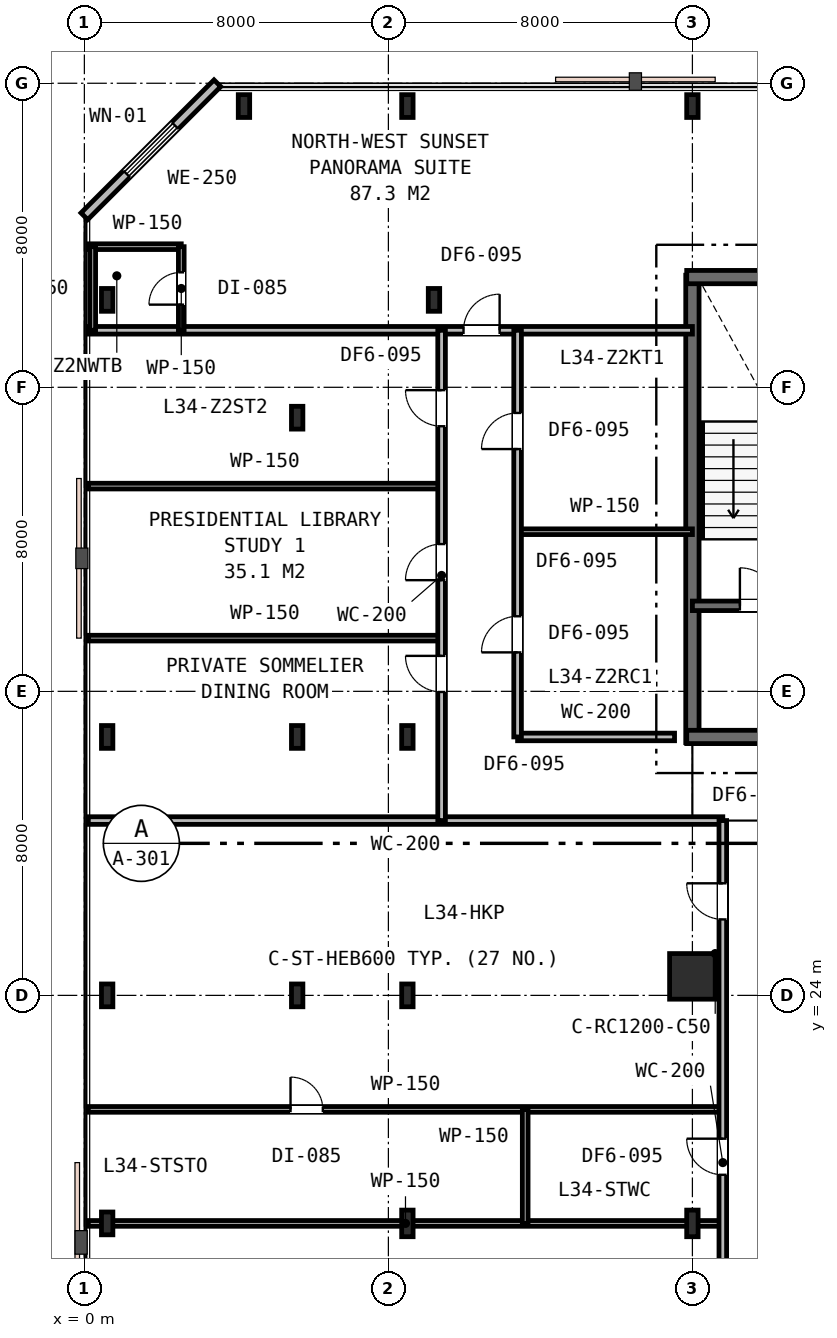
"""IFC4 building model, lengths in metres.
Left out: names, types, materials, properties, quantities, classifications, styles, units other than length and angle.
Written with IfcOpenShell. Run it as: python <this file> out.ifc"""

import sys

from ifc_helpers import new_model, si_unit, direction, frame, frame_2d, origin, origin_2d, place, context, subcontext, project, spatial, rectangle, i_section, extrude, element, fill, save


model = new_model("IFC4")
c1 = context("Model", 3, precision=1e-05, world=origin(), true_north=direction((0.0, 1.0)))
c2 = subcontext(c1, "Body", "Model", "MODEL_VIEW")
j1 = project(units=[si_unit("LENGTHUNIT", "METRE"), si_unit("PLANEANGLEUNIT", "RADIAN")], contexts=[c1])
p1 = place(None, origin())
s1 = spatial("IfcSite", under=j1, at=p1, CompositionType="ELEMENT")
p2 = place(p1, origin())
s2 = spatial("IfcBuilding", under=s1, at=p2, CompositionType="ELEMENT")
p3 = place(p2, frame((0.0, 0.0, 133.2)))
s3 = spatial("IfcBuildingStorey", under=s2, at=p3, CompositionType="ELEMENT", Elevation=133.2)
p4 = place(p3, frame((16.0, 30.65, 0.0), z_axis=(0.0, 0.0, 1.0), x_axis=(0.0, 1.0, 0.0)))
e1 = element("IfcWall", 1, at=p4, inside=s3, PredefinedType="SHEAR", context=c2, shape_type="SweptSolid", body=[
    extrude(rectangle(XDim=12.3, YDim=0.35, at=frame_2d((6.15, 0.0))), origin(), (0.0, 0.0, 1.0), 3.6),
])
p5 = place(p3, frame((15.85, 42.9, 0.0), z_axis=(0.0, 0.0, 1.0), x_axis=(1.0, 0.0, 0.0)))
e2 = element("IfcWall", 2, at=p5, inside=s3, PredefinedType="SHEAR", context=c2, shape_type="SweptSolid", body=[
    extrude(rectangle(XDim=24.3, YDim=0.35, at=frame_2d((12.15, 0.0))), origin(), (0.0, 0.0, 1.0), 3.6),
])
p6 = place(p3, frame((15.85, 30.8, 0.0), z_axis=(0.0, 0.0, 1.0), x_axis=(1.0, 0.0, 0.0)))
e3 = element("IfcWall", 3, at=p6, inside=s3, PredefinedType="SHEAR", context=c2, shape_type="SweptSolid", body=[
    extrude(rectangle(XDim=11.2, YDim=0.35, at=frame_2d((5.6, 0.0))), origin(), (0.0, 0.0, 1.0), 3.6),
])
p7 = place(p6, frame((2.45, 0.0, 0.0)))
e4 = element("IfcOpeningElement", 4, at=p7, cuts=e3, PredefinedType="OPENING", context=c2, shape_type="SweptSolid", body=[
    extrude(rectangle(XDim=1.1, YDim=2.15, at=frame_2d((0.55, 1.075))), frame((0.0, 0.185, 0.0), z_axis=(0.0, -1.0, 0.0), x_axis=(1.0, 0.0, 0.0)), (0.0, 0.0, 1.0), 0.37),
])
p8 = place(p3, frame((16.0, 34.25, 0.0), z_axis=(0.0, 0.0, 1.0), x_axis=(1.0, 0.0, 0.0)))
e5 = element("IfcWall", 5, at=p8, inside=s3, PredefinedType="SHEAR", context=c2, shape_type="SweptSolid", body=[
    extrude(rectangle(XDim=6.05, YDim=0.25, at=frame_2d((3.025, 0.0))), origin(), (0.0, 0.0, 1.0), 3.6),
])
p9 = place(p8, frame((1.25, 0.0, 0.0)))
e6 = element("IfcOpeningElement", 6, at=p9, cuts=e5, PredefinedType="OPENING", context=c2, shape_type="SweptSolid", body=[
    extrude(rectangle(XDim=1.0, YDim=2.15, at=frame_2d((0.5, 1.075))), frame((0.0, 0.135, 0.0), z_axis=(0.0, -1.0, 0.0), x_axis=(1.0, 0.0, 0.0)), (0.0, 0.0, 1.0), 0.27),
])
p10 = place(p8, frame((4.2, 0.0, 0.0)))
e7 = element("IfcOpeningElement", 7, at=p10, cuts=e5, PredefinedType="OPENING", context=c2, shape_type="SweptSolid", body=[
    extrude(rectangle(XDim=1.1, YDim=2.15, at=frame_2d((0.55, 1.075))), frame((0.0, 0.135, 0.0), z_axis=(0.0, -1.0, 0.0), x_axis=(1.0, 0.0, 0.0)), (0.0, 0.0, 1.0), 0.27),
])
p11 = place(p3, frame((8.5, 24.0, 0.0), z_axis=(0.0, 0.0, 1.0), x_axis=(1.0, 0.0, 0.0)))
e8 = element("IfcColumn", 8, at=p11, inside=s3, PredefinedType="COLUMN", context=c2, shape_type="SweptSolid", body=[
    extrude(i_section(OverallWidth=0.3, OverallDepth=0.6, WebThickness=0.015, FlangeThickness=0.03, FilletRadius=0.027, at=origin_2d()), origin(), (0.0, 0.0, 1.0), 3.6),
])
p12 = place(p3, frame((16.0, 24.5, 0.0), z_axis=(0.0, 0.0, 1.0), x_axis=(1.0, 0.0, 0.0)))
e9 = element("IfcColumn", 9, at=p12, inside=s3, PredefinedType="COLUMN", context=c2, shape_type="SweptSolid", body=[
    extrude(rectangle(XDim=1.2, YDim=1.2, at=origin_2d()), origin(), (0.0, 0.0, 1.0), 3.6),
])
for number, where, z_axis, x_axis in (
    (10, (5.6, 24.0, 0.0), (0.0, 0.0, 1.0), (1.0, 0.0, 0.0)),
    (11, (5.6, 30.8, 0.0), (0.0, 0.0, 1.0), (1.0, 0.0, 0.0)),
    (12, (5.6, 39.2, 0.0), (0.0, 0.0, 1.0), (1.0, 0.0, 0.0)),
    (13, (8.5, 30.8, 0.0), (0.0, 0.0, 1.0), (1.0, 0.0, 0.0)),
    (14, (9.2, 42.3, 0.0), (0.0, 0.0, 1.0), (1.0, 0.0, 0.0)),
    (15, (0.6, 24.0, 0.0), (0.0, 0.0, 1.0), (1.0, 0.0, 0.0)),
    (16, (0.6, 30.8, 0.0), (0.0, 0.0, 1.0), (1.0, 0.0, 0.0)),
    (17, (0.6, 42.3, 0.0), (0.0, 0.0, 1.0), (1.0, 0.0, 0.0)),
    (18, (4.2, 47.4, 0.0), (0.0, 0.0, 1.0), (1.0, 0.0, 0.0)),
    (19, (8.5, 47.4, 0.0), (0.0, 0.0, 1.0), (1.0, 0.0, 0.0)),
    (20, (16.0, 47.4, 0.0), (0.0, 0.0, 1.0), (1.0, 0.0, 0.0)),
    (21, (0.6, 18.0, 0.0), (0.0, 0.0, 1.0), (1.0, 0.0, 0.0)),
):
    element("IfcColumn", number, at=place(p3, frame(where, z_axis=z_axis, x_axis=x_axis)), inside=s3, PredefinedType="COLUMN", context=c2, shape_type="SweptSolid", body=[
        extrude(i_section(OverallWidth=0.3, OverallDepth=0.6, WebThickness=0.015, FlangeThickness=0.03, FilletRadius=0.027, at=origin_2d()), origin(), (0.0, 0.0, 1.0), 3.6),
    ])
for number, where, z_axis, x_axis in (
    (22, (8.5, 18.0, 0.0), (0.0, 0.0, 1.0), (1.0, 0.0, 0.0)),
    (23, (16.0, 18.0, 0.0), (0.0, 0.0, 1.0), (1.0, 0.0, 0.0)),
):
    element("IfcColumn", number, at=place(p3, frame(where, z_axis=z_axis, x_axis=x_axis)), inside=s3, PredefinedType="COLUMN", context=c2, shape_type="SweptSolid", body=[
        extrude(i_section(OverallWidth=0.3, OverallDepth=0.7, WebThickness=0.017, FlangeThickness=0.032, FilletRadius=0.027, at=origin_2d()), origin(), (0.0, 0.0, 1.0), 3.6),
    ])
p13 = place(p3, frame((3.5, 48.0, 0.0), z_axis=(0.0, 0.0, 1.0), x_axis=(-0.707106781187, -0.707106781187, 0.0)))
e24 = element("IfcWall", 24, at=p13, inside=s3, PredefinedType="STANDARD", context=c2, shape_type="SweptSolid", body=[
    extrude(rectangle(XDim=4.95, YDim=0.25, at=frame_2d((2.475, 0.0))), origin(), (0.0, 0.0, 1.0), 3.33),
])
p14 = place(p13, frame((1.575, 0.0, 0.75)))
e25 = element("IfcOpeningElement", 25, at=p14, cuts=e24, PredefinedType="OPENING", context=c2, shape_type="SweptSolid", body=[
    extrude(rectangle(XDim=1.8, YDim=1.85, at=frame_2d((0.9, 0.925))), frame((0.0, 0.135, 0.0), z_axis=(0.0, -1.0, 0.0), x_axis=(1.0, 0.0, 0.0)), (0.0, 0.0, 1.0), 0.27),
])
p15 = place(p3, frame((0.1, 28.6, 0.0), z_axis=(0.0, 0.0, 1.0), x_axis=(1.0, 0.0, 0.0)))
e26 = element("IfcWall", 26, at=p15, inside=s3, PredefinedType="PARTITIONING", context=c2, shape_type="SweptSolid", body=[
    extrude(rectangle(XDim=16.7, YDim=0.2, at=frame_2d((8.35, 0.0))), origin(), (0.0, 0.0, 1.0), 2.93),
])
p16 = place(p3, frame((11.4, 30.8, 0.0), z_axis=(0.0, 0.0, 1.0), x_axis=(1.0, 0.0, 0.0)))
e27 = element("IfcWall", 27, at=p16, inside=s3, PredefinedType="PARTITIONING", context=c2, shape_type="SweptSolid", body=[
    extrude(rectangle(XDim=4.13, YDim=0.2, at=frame_2d((2.065, 0.0))), origin(), (0.0, 0.0, 1.0), 2.93),
])
p17 = place(p3, frame((0.1, 18.0, 0.0), z_axis=(0.0, 0.0, 1.0), x_axis=(1.0, 0.0, 0.0)))
e28 = element("IfcWall", 28, at=p17, inside=s3, PredefinedType="PARTITIONING", context=c2, shape_type="SweptSolid", body=[
    extrude(rectangle(XDim=16.7, YDim=0.15, at=frame_2d((8.35, 0.0))), origin(), (0.0, 0.0, 1.0), 2.93),
])
p18 = place(p3, frame((0.1, 21.0, 0.0), z_axis=(0.0, 0.0, 1.0), x_axis=(1.0, 0.0, 0.0)))
e29 = element("IfcWall", 29, at=p18, inside=s3, PredefinedType="PARTITIONING", context=c2, shape_type="SweptSolid", body=[
    extrude(rectangle(XDim=16.7, YDim=0.15, at=frame_2d((8.35, 0.0))), origin(), (0.0, 0.0, 1.0), 2.93),
])
p19 = place(p18, frame((5.325, 0.0, 0.0)))
e30 = element("IfcOpeningElement", 30, at=p19, cuts=e29, PredefinedType="OPENING", context=c2, shape_type="SweptSolid", body=[
    extrude(rectangle(XDim=0.85, YDim=2.15, at=frame_2d((0.425, 1.075))), frame((0.0, 0.085, 0.0), z_axis=(0.0, -1.0, 0.0), x_axis=(1.0, 0.0, 0.0)), (0.0, 0.0, 1.0), 0.17),
])
p20 = place(p3, frame((11.6, 18.0, 0.0), z_axis=(0.0, 0.0, 1.0), x_axis=(0.0, 1.0, 0.0)))
e31 = element("IfcWall", 31, at=p20, inside=s3, PredefinedType="PARTITIONING", context=c2, shape_type="SweptSolid", body=[
    extrude(rectangle(XDim=3.0, YDim=0.15, at=frame_2d((1.5, 0.0))), origin(), (0.0, 0.0, 1.0), 2.93),
])
p21 = place(p3, frame((16.8, 10.6, 0.0), z_axis=(0.0, 0.0, 1.0), x_axis=(0.0, 1.0, 0.0)))
e32 = element("IfcWall", 32, at=p21, inside=s3, PredefinedType="PARTITIONING", context=c2, shape_type="SweptSolid", body=[
    extrude(rectangle(XDim=18.0, YDim=0.2, at=frame_2d((9.0, 0.0))), origin(), (0.0, 0.0, 1.0), 2.93),
])
p22 = place(p21, frame((8.679, 0.0, 0.0)))
e33 = element("IfcOpeningElement", 33, at=p22, cuts=e32, PredefinedType="OPENING", context=c2, shape_type="SweptSolid", body=[
    extrude(rectangle(XDim=0.95, YDim=2.15, at=frame_2d((0.475, 1.075))), frame((0.0, 0.11, 0.0), z_axis=(0.0, -1.0, 0.0), x_axis=(1.0, 0.0, 0.0)), (0.0, 0.0, 1.0), 0.22),
])
p23 = place(p21, frame((15.399, 0.0, 0.0)))
e34 = element("IfcOpeningElement", 34, at=p23, cuts=e32, PredefinedType="OPENING", context=c2, shape_type="SweptSolid", body=[
    extrude(rectangle(XDim=0.95, YDim=2.15, at=frame_2d((0.475, 1.075))), frame((0.0, 0.11, 0.0), z_axis=(0.0, -1.0, 0.0), x_axis=(1.0, 0.0, 0.0)), (0.0, 0.0, 1.0), 0.22),
])
p24 = place(p21, frame((4.273, 0.0, 0.0)))
e35 = element("IfcOpeningElement", 35, at=p24, cuts=e32, PredefinedType="OPENING", context=c2, shape_type="SweptSolid", body=[
    extrude(rectangle(XDim=0.95, YDim=2.15, at=frame_2d((0.475, 1.075))), frame((0.0, 0.11, 0.0), z_axis=(0.0, -1.0, 0.0), x_axis=(1.0, 0.0, 0.0)), (0.0, 0.0, 1.0), 0.22),
])
p25 = place(p3, frame((0.1, 41.5, 0.0), z_axis=(0.0, 0.0, 1.0), x_axis=(1.0, 0.0, 0.0)))
e36 = element("IfcWall", 36, at=p25, inside=s3, PredefinedType="PARTITIONING", context=c2, shape_type="SweptSolid", body=[
    extrude(rectangle(XDim=15.9, YDim=0.2, at=frame_2d((7.95, 0.0))), origin(), (0.0, 0.0, 1.0), 2.93),
])
p26 = place(p25, frame((9.877, 0.0, 0.0)))
e37 = element("IfcOpeningElement", 37, at=p26, cuts=e36, PredefinedType="OPENING", context=c2, shape_type="SweptSolid", body=[
    extrude(rectangle(XDim=0.95, YDim=2.15, at=frame_2d((0.475, 1.075))), frame((0.0, 0.11, 0.0), z_axis=(0.0, -1.0, 0.0), x_axis=(1.0, 0.0, 0.0)), (0.0, 0.0, 1.0), 0.22),
])
p27 = place(p3, frame((0.1, 43.7, 0.0), z_axis=(0.0, 0.0, 1.0), x_axis=(1.0, 0.0, 0.0)))
e38 = element("IfcWall", 38, at=p27, inside=s3, PredefinedType="PARTITIONING", context=c2, shape_type="SweptSolid", body=[
    extrude(rectangle(XDim=2.45, YDim=0.15, at=frame_2d((1.225, 0.0))), origin(), (0.0, 0.0, 1.0), 3.33),
])
p28 = place(p3, frame((2.55, 41.5, 0.0), z_axis=(0.0, 0.0, 1.0), x_axis=(0.0, 1.0, 0.0)))
e39 = element("IfcWall", 39, at=p28, inside=s3, PredefinedType="PARTITIONING", context=c2, shape_type="SweptSolid", body=[
    extrude(rectangle(XDim=2.2, YDim=0.15, at=frame_2d((1.1, 0.0))), origin(), (0.0, 0.0, 1.0), 2.93),
])
p29 = place(p28, frame((0.675, 0.0, 0.0)))
e40 = element("IfcOpeningElement", 40, at=p29, cuts=e39, PredefinedType="OPENING", context=c2, shape_type="SweptSolid", body=[
    extrude(rectangle(XDim=0.85, YDim=2.15, at=frame_2d((0.425, 1.075))), frame((0.0, 0.085, 0.0), z_axis=(0.0, -1.0, 0.0), x_axis=(1.0, 0.0, 0.0)), (0.0, 0.0, 1.0), 0.17),
])
p30 = place(p3, frame((0.22, 41.5, 0.0), z_axis=(0.0, 0.0, 1.0), x_axis=(0.0, 1.0, 0.0)))
e41 = element("IfcWall", 41, at=p30, inside=s3, PredefinedType="PARTITIONING", context=c2, shape_type="SweptSolid", body=[
    extrude(rectangle(XDim=2.2, YDim=0.15, at=frame_2d((1.1, 0.0))), origin(), (0.0, 0.0, 1.0), 2.93),
])
for number, where, z_axis, x_axis in (
    (42, (0.1, 33.4, 0.0), (0.0, 0.0, 1.0), (1.0, 0.0, 0.0)),
    (43, (0.1, 37.4, 0.0), (0.0, 0.0, 1.0), (1.0, 0.0, 0.0)),
):
    element("IfcWall", number, at=place(p3, frame(where, z_axis=z_axis, x_axis=x_axis)), inside=s3, PredefinedType="PARTITIONING", context=c2, shape_type="SweptSolid", body=[
        extrude(rectangle(XDim=9.3, YDim=0.15, at=frame_2d((4.65, 0.0))), origin(), (0.0, 0.0, 1.0), 2.93),
    ])
p31 = place(p3, frame((11.4, 36.2, 0.0), z_axis=(0.0, 0.0, 1.0), x_axis=(1.0, 0.0, 0.0)))
e44 = element("IfcWall", 44, at=p31, inside=s3, PredefinedType="PARTITIONING", context=c2, shape_type="SweptSolid", body=[
    extrude(rectangle(XDim=4.6, YDim=0.15, at=frame_2d((2.3, 0.0))), origin(), (0.0, 0.0, 1.0), 3.33),
])
p32 = place(p3, frame((9.4, 28.6, 0.0), z_axis=(0.0, 0.0, 1.0), x_axis=(0.0, 1.0, 0.0)))
e45 = element("IfcWall", 45, at=p32, inside=s3, PredefinedType="PARTITIONING", context=c2, shape_type="SweptSolid", body=[
    extrude(rectangle(XDim=12.9, YDim=0.2, at=frame_2d((6.45, 0.0))), origin(), (0.0, 0.0, 1.0), 2.93),
])
p33 = place(p32, frame((3.383, 0.0, 0.0)))
e46 = element("IfcOpeningElement", 46, at=p33, cuts=e45, PredefinedType="OPENING", context=c2, shape_type="SweptSolid", body=[
    extrude(rectangle(XDim=0.95, YDim=2.15, at=frame_2d((0.475, 1.075))), frame((0.0, 0.11, 0.0), z_axis=(0.0, -1.0, 0.0), x_axis=(1.0, 0.0, 0.0)), (0.0, 0.0, 1.0), 0.22),
])
p34 = place(p32, frame((6.325, 0.0, 0.0)))
e47 = element("IfcOpeningElement", 47, at=p34, cuts=e45, PredefinedType="OPENING", context=c2, shape_type="SweptSolid", body=[
    extrude(rectangle(XDim=0.95, YDim=2.15, at=frame_2d((0.475, 1.075))), frame((0.0, 0.11, 0.0), z_axis=(0.0, -1.0, 0.0), x_axis=(1.0, 0.0, 0.0)), (0.0, 0.0, 1.0), 0.22),
])
p35 = place(p32, frame((10.375, 0.0, 0.0)))
e48 = element("IfcOpeningElement", 48, at=p35, cuts=e45, PredefinedType="OPENING", context=c2, shape_type="SweptSolid", body=[
    extrude(rectangle(XDim=0.95, YDim=2.15, at=frame_2d((0.475, 1.075))), frame((0.0, 0.11, 0.0), z_axis=(0.0, -1.0, 0.0), x_axis=(1.0, 0.0, 0.0)), (0.0, 0.0, 1.0), 0.22),
])
p36 = place(p3, frame((11.4, 30.8, 0.0), z_axis=(0.0, 0.0, 1.0), x_axis=(0.0, 1.0, 0.0)))
e49 = element("IfcWall", 49, at=p36, inside=s3, PredefinedType="PARTITIONING", context=c2, shape_type="SweptSolid", body=[
    extrude(rectangle(XDim=10.7, YDim=0.2, at=frame_2d((5.35, 0.0))), origin(), (0.0, 0.0, 1.0), 2.93),
])
p37 = place(p36, frame((2.225, 0.0, 0.0)))
e50 = element("IfcOpeningElement", 50, at=p37, cuts=e49, PredefinedType="OPENING", context=c2, shape_type="SweptSolid", body=[
    extrude(rectangle(XDim=0.95, YDim=2.15, at=frame_2d((0.475, 1.075))), frame((0.0, 0.11, 0.0), z_axis=(0.0, -1.0, 0.0), x_axis=(1.0, 0.0, 0.0)), (0.0, 0.0, 1.0), 0.22),
])
p38 = place(p36, frame((7.575, 0.0, 0.0)))
e51 = element("IfcOpeningElement", 51, at=p38, cuts=e49, PredefinedType="OPENING", context=c2, shape_type="SweptSolid", body=[
    extrude(rectangle(XDim=0.95, YDim=2.15, at=frame_2d((0.475, 1.075))), frame((0.0, 0.11, 0.0), z_axis=(0.0, -1.0, 0.0), x_axis=(1.0, 0.0, 0.0)), (0.0, 0.0, 1.0), 0.22),
])
p39 = place(p14, origin())
e52 = element("IfcWindow", 52, at=p39, inside=s3, PartitioningType="SINGLE_PANEL", PredefinedType="WINDOW", context=c2, shape_type="SweptSolid", body=[
    extrude(rectangle(XDim=1.8, YDim=1.85, at=frame_2d((0.9, 0.925))), frame((0.0, 0.03, 0.0), z_axis=(0.0, -1.0, 0.0), x_axis=(1.0, 0.0, 0.0)), (0.0, 0.0, 1.0), 0.06),
])
fill(e25, e52)
p40 = place(p9, origin())
e53 = element("IfcDoor", 53, at=p40, inside=s3, OperationType="SINGLE_SWING_LEFT", PredefinedType="DOOR", context=c2, shape_type="SweptSolid", body=[
    extrude(rectangle(XDim=1.0, YDim=2.15, at=frame_2d((0.5, 1.075))), frame((0.0, 0.025, 0.0), z_axis=(0.0, -1.0, 0.0), x_axis=(1.0, 0.0, 0.0)), (0.0, 0.0, 1.0), 0.05),
])
fill(e6, e53)
p41 = place(p22, origin())
e54 = element("IfcDoor", 54, at=p41, inside=s3, OperationType="SINGLE_SWING_RIGHT", PredefinedType="DOOR", context=c2, shape_type="SweptSolid", body=[
    extrude(rectangle(XDim=0.95, YDim=2.15, at=frame_2d((0.475, 1.075))), frame((0.0, 0.025, 0.0), z_axis=(0.0, -1.0, 0.0), x_axis=(1.0, 0.0, 0.0)), (0.0, 0.0, 1.0), 0.05),
])
fill(e33, e54)
p42 = place(p19, origin())
e55 = element("IfcDoor", 55, at=p42, inside=s3, OperationType="SINGLE_SWING_LEFT", PredefinedType="DOOR", context=c2, shape_type="SweptSolid", body=[
    extrude(rectangle(XDim=0.85, YDim=2.15, at=frame_2d((0.425, 1.075))), frame((0.0, 0.025, 0.0), z_axis=(0.0, -1.0, 0.0), x_axis=(1.0, 0.0, 0.0)), (0.0, 0.0, 1.0), 0.05),
])
fill(e30, e55)
p43 = place(p23, origin())
e56 = element("IfcDoor", 56, at=p43, inside=s3, OperationType="SINGLE_SWING_RIGHT", PredefinedType="DOOR", context=c2, shape_type="SweptSolid", body=[
    extrude(rectangle(XDim=0.95, YDim=2.15, at=frame_2d((0.475, 1.075))), frame((0.0, 0.025, 0.0), z_axis=(0.0, -1.0, 0.0), x_axis=(1.0, 0.0, 0.0)), (0.0, 0.0, 1.0), 0.05),
])
fill(e34, e56)
p44 = place(p26, origin())
e57 = element("IfcDoor", 57, at=p44, inside=s3, OperationType="SINGLE_SWING_RIGHT", PredefinedType="DOOR", context=c2, shape_type="SweptSolid", body=[
    extrude(rectangle(XDim=0.95, YDim=2.15, at=frame_2d((0.475, 1.075))), frame((0.0, 0.025, 0.0), z_axis=(0.0, -1.0, 0.0), x_axis=(1.0, 0.0, 0.0)), (0.0, 0.0, 1.0), 0.05),
])
fill(e37, e57)
p45 = place(p29, origin())
e58 = element("IfcDoor", 58, at=p45, inside=s3, OperationType="SINGLE_SWING_LEFT", PredefinedType="DOOR", context=c2, shape_type="SweptSolid", body=[
    extrude(rectangle(XDim=0.85, YDim=2.15, at=frame_2d((0.425, 1.075))), frame((0.0, 0.025, 0.0), z_axis=(0.0, -1.0, 0.0), x_axis=(1.0, 0.0, 0.0)), (0.0, 0.0, 1.0), 0.05),
])
fill(e40, e58)
p46 = place(p33, origin())
e59 = element("IfcDoor", 59, at=p46, inside=s3, OperationType="SINGLE_SWING_RIGHT", PredefinedType="DOOR", context=c2, shape_type="SweptSolid", body=[
    extrude(rectangle(XDim=0.95, YDim=2.15, at=frame_2d((0.475, 1.075))), frame((0.0, 0.025, 0.0), z_axis=(0.0, -1.0, 0.0), x_axis=(1.0, 0.0, 0.0)), (0.0, 0.0, 1.0), 0.05),
])
fill(e46, e59)
p47 = place(p34, origin())
e60 = element("IfcDoor", 60, at=p47, inside=s3, OperationType="SINGLE_SWING_LEFT", PredefinedType="DOOR", context=c2, shape_type="SweptSolid", body=[
    extrude(rectangle(XDim=0.95, YDim=2.15, at=frame_2d((0.475, 1.075))), frame((0.0, 0.025, 0.0), z_axis=(0.0, -1.0, 0.0), x_axis=(1.0, 0.0, 0.0)), (0.0, 0.0, 1.0), 0.05),
])
fill(e47, e60)
p48 = place(p35, origin())
e61 = element("IfcDoor", 61, at=p48, inside=s3, OperationType="SINGLE_SWING_RIGHT", PredefinedType="DOOR", context=c2, shape_type="SweptSolid", body=[
    extrude(rectangle(XDim=0.95, YDim=2.15, at=frame_2d((0.475, 1.075))), frame((0.0, 0.025, 0.0), z_axis=(0.0, -1.0, 0.0), x_axis=(1.0, 0.0, 0.0)), (0.0, 0.0, 1.0), 0.05),
])
fill(e48, e61)
p49 = place(p37, origin())
e62 = element("IfcDoor", 62, at=p49, inside=s3, OperationType="SINGLE_SWING_LEFT", PredefinedType="DOOR", context=c2, shape_type="SweptSolid", body=[
    extrude(rectangle(XDim=0.95, YDim=2.15, at=frame_2d((0.475, 1.075))), frame((0.0, 0.025, 0.0), z_axis=(0.0, -1.0, 0.0), x_axis=(1.0, 0.0, 0.0)), (0.0, 0.0, 1.0), 0.05),
])
fill(e50, e62)
p50 = place(p38, origin())
e63 = element("IfcDoor", 63, at=p50, inside=s3, OperationType="SINGLE_SWING_LEFT", PredefinedType="DOOR", context=c2, shape_type="SweptSolid", body=[
    extrude(rectangle(XDim=0.95, YDim=2.15, at=frame_2d((0.475, 1.075))), frame((0.0, 0.025, 0.0), z_axis=(0.0, -1.0, 0.0), x_axis=(1.0, 0.0, 0.0)), (0.0, 0.0, 1.0), 0.05),
])
fill(e51, e63)
save(model, sys.argv[1])
